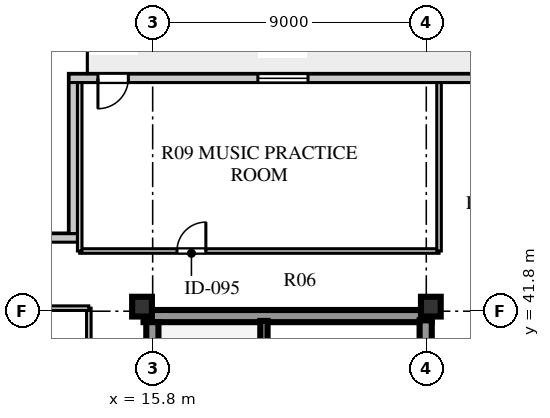
"""IFC4 building model, lengths in metres.
Left out: names, types, materials, properties, quantities, classifications, styles, units other than length and angle.
Written with IfcOpenShell. Run it as: python <this file> out.ifc"""

import sys

from ifc_helpers import new_model, si_unit, direction, frame, frame_2d, origin, origin_2d, place, context, subcontext, project, spatial, rectangle, extrude, element, fill, save


model = new_model("IFC4")
c1 = context("Model", 3, precision=1e-05, world=origin(), true_north=direction((0.0, 1.0)))
c2 = subcontext(c1, "Body", "Model", "MODEL_VIEW")
j1 = project(units=[si_unit("LENGTHUNIT", "METRE"), si_unit("PLANEANGLEUNIT", "RADIAN")], contexts=[c1])
p1 = place(None, origin())
s1 = spatial("IfcSite", under=j1, at=p1, CompositionType="ELEMENT")
p2 = place(p1, origin())
s2 = spatial("IfcBuilding", under=s1, at=p2, CompositionType="ELEMENT")
p3 = place(p2, frame((0.0, 0.0, 245.3)))
s3 = spatial("IfcBuildingStorey", under=s2, at=p3, CompositionType="ELEMENT", Elevation=245.3)
p4 = place(p3, frame((15.5, 41.64, 0.0), z_axis=(0.0, 0.0, 1.0), x_axis=(1.0, 0.0, 0.0)))
e1 = element("IfcWall", 1, at=p4, inside=s3, PredefinedType="SHEAR", context=c2, shape_type="SweptSolid", body=[
    extrude(rectangle(XDim=9.48, YDim=0.4, at=frame_2d((4.74, 0.0))), origin(), (0.0, 0.0, 1.0), 3.66),
])
p5 = place(p3, frame((15.79, 15.81, 0.0), z_axis=(0.0, 0.0, 1.0), x_axis=(0.0, 1.0, 0.0)))
e2 = element("IfcWall", 2, at=p5, inside=s3, PredefinedType="SHEAR", context=c2, shape_type="SweptSolid", body=[
    extrude(rectangle(XDim=25.63, YDim=0.4, at=frame_2d((12.815, 0.0))), origin(), (0.0, 0.0, 1.0), 3.66),
])
p6 = place(p3, frame((24.78, 15.74, 0.0), z_axis=(0.0, 0.0, 1.0), x_axis=(0.0, 1.0, 0.0)))
e3 = element("IfcWall", 3, at=p6, inside=s3, PredefinedType="SHEAR", context=c2, shape_type="SweptSolid", body=[
    extrude(rectangle(XDim=25.76, YDim=0.4, at=frame_2d((12.88, 0.0))), origin(), (0.0, 0.0, 1.0), 3.66),
])
p7 = place(p6, frame((1.61, 0.0, 0.0)))
e4 = element("IfcOpeningElement", 4, at=p7, cuts=e3, PredefinedType="OPENING", context=c2, shape_type="SweptSolid", body=[
    extrude(rectangle(XDim=1.2, YDim=2.1, at=frame_2d((0.6, 1.05))), frame((0.0, 0.21, 0.0), z_axis=(0.0, -1.0, 0.0), x_axis=(1.0, 0.0, 0.0)), (0.0, 0.0, 1.0), 0.42),
])
p8 = place(p6, frame((6.78, 0.0, 0.0)))
e5 = element("IfcOpeningElement", 5, at=p8, cuts=e3, PredefinedType="OPENING", context=c2, shape_type="SweptSolid", body=[
    extrude(rectangle(XDim=0.85, YDim=2.06, at=frame_2d((0.425, 1.03))), frame((0.0, 0.21, 0.0), z_axis=(0.0, -1.0, 0.0), x_axis=(1.0, 0.0, 0.0)), (0.0, 0.0, 1.0), 0.42),
])
p9 = place(p6, frame((12.11, 0.0, 0.0)))
e6 = element("IfcOpeningElement", 6, at=p9, cuts=e3, PredefinedType="OPENING", context=c2, shape_type="SweptSolid", body=[
    extrude(rectangle(XDim=1.5, YDim=2.12, at=frame_2d((0.75, 1.06))), frame((0.0, 0.21, 0.0), z_axis=(0.0, -1.0, 0.0), x_axis=(1.0, 0.0, 0.0)), (0.0, 0.0, 1.0), 0.42),
])
p10 = place(p6, frame((20.11, 0.0, 0.0)))
e7 = element("IfcOpeningElement", 7, at=p10, cuts=e3, PredefinedType="OPENING", context=c2, shape_type="SweptSolid", body=[
    extrude(rectangle(XDim=1.2, YDim=2.12, at=frame_2d((0.6, 1.06))), frame((0.0, 0.21, 0.0), z_axis=(0.0, -1.0, 0.0), x_axis=(1.0, 0.0, 0.0)), (0.0, 0.0, 1.0), 0.42),
])
p11 = place(p6, frame((24.01, 0.0, 0.0)))
e8 = element("IfcOpeningElement", 8, at=p11, cuts=e3, PredefinedType="OPENING", context=c2, shape_type="SweptSolid", body=[
    extrude(rectangle(XDim=0.95, YDim=2.1, at=frame_2d((0.475, 1.05))), frame((0.0, 0.21, 0.0), z_axis=(0.0, -1.0, 0.0), x_axis=(1.0, 0.0, 0.0)), (0.0, 0.0, 1.0), 0.42),
])
for number, where, z_axis, x_axis in (
    (9, (15.45, 41.95, 0.0), (0.0, 0.0, 1.0), (1.0, 0.0, 0.0)),
    (10, (24.95, 41.95, 0.0), (0.0, 0.0, 1.0), (1.0, 0.0, 0.0)),
):
    element("IfcColumn", number, at=place(p3, frame(where, z_axis=z_axis, x_axis=x_axis)), inside=s3, PredefinedType="COLUMN", context=c2, shape_type="SweptSolid", body=[
        extrude(rectangle(XDim=0.65, YDim=0.65, at=origin_2d()), origin(), (0.0, 0.0, 1.0), 3.66),
    ])
p12 = place(p3, frame((45.55, 49.46, 0.0), z_axis=(0.0, 0.0, 1.0), x_axis=(-1.0, 0.0, 0.0)))
e11 = element("IfcWall", 11, at=p12, inside=s3, PredefinedType="STANDARD", context=c2, shape_type="SweptSolid", body=[
    extrude(rectangle(XDim=32.5, YDim=0.28, at=frame_2d((16.25, 0.0))), origin(), (0.0, 0.0, 1.0), 3.66),
])
p13 = place(p12, frame((30.55, 0.0, 0.0)))
e12 = element("IfcOpeningElement", 12, at=p13, cuts=e11, PredefinedType="OPENING", context=c2, shape_type="SweptSolid", body=[
    extrude(rectangle(XDim=1.0, YDim=2.05, at=frame_2d((0.5, 1.025))), frame((0.0, 0.15, 0.0), z_axis=(0.0, -1.0, 0.0), x_axis=(1.0, 0.0, 0.0)), (0.0, 0.0, 1.0), 0.3),
])
p14 = place(p12, frame((24.64, 0.0, 0.8)))
e13 = element("IfcOpeningElement", 13, at=p14, cuts=e11, PredefinedType="OPENING", context=c2, shape_type="SweptSolid", body=[
    extrude(rectangle(XDim=1.65, YDim=1.95, at=frame_2d((0.825, 0.975))), frame((0.0, 0.15, 0.0), z_axis=(0.0, -1.0, 0.0), x_axis=(1.0, 0.0, 0.0)), (0.0, 0.0, 1.0), 0.3),
])
p15 = place(p12, frame((14.605, 0.0, 0.8)))
e14 = element("IfcOpeningElement", 14, at=p15, cuts=e11, PredefinedType="OPENING", context=c2, shape_type="SweptSolid", body=[
    extrude(rectangle(XDim=1.95, YDim=2.0, at=frame_2d((0.975, 1.0))), frame((0.0, 0.15, 0.0), z_axis=(0.0, -1.0, 0.0), x_axis=(1.0, 0.0, 0.0)), (0.0, 0.0, 1.0), 0.3),
])
p16 = place(p12, frame((4.345, 0.0, 0.8)))
e15 = element("IfcOpeningElement", 15, at=p16, cuts=e11, PredefinedType="OPENING", context=c2, shape_type="SweptSolid", body=[
    extrude(rectangle(XDim=2.25, YDim=2.0, at=frame_2d((1.125, 1.0))), frame((0.0, 0.15, 0.0), z_axis=(0.0, -1.0, 0.0), x_axis=(1.0, 0.0, 0.0)), (0.0, 0.0, 1.0), 0.3),
])
p17 = place(p3, frame((13.19, 49.32, 0.0), z_axis=(0.0, 0.0, 1.0), x_axis=(0.0, -1.0, 0.0)))
e16 = element("IfcWall", 16, at=p17, inside=s3, PredefinedType="STANDARD", context=c2, shape_type="SweptSolid", body=[
    extrude(rectangle(XDim=4.97, YDim=0.28, at=frame_2d((2.485, 0.0))), origin(), (0.0, 0.0, 1.0), 3.66),
])
p18 = place(p3, frame((13.33, 44.21, 0.0), z_axis=(0.0, 0.0, 1.0), x_axis=(-1.0, 0.0, 0.0)))
e17 = element("IfcWall", 17, at=p18, inside=s3, PredefinedType="STANDARD", context=c2, shape_type="SweptSolid", body=[
    extrude(rectangle(XDim=5.53, YDim=0.28, at=frame_2d((2.765, 0.0))), origin(), (0.0, 0.0, 1.0), 3.66),
])
p19 = place(p3, frame((19.46, 33.3, 0.0), z_axis=(0.0, 0.0, 1.0), x_axis=(0.0, 1.0, 0.0)))
e18 = element("IfcWall", 18, at=p19, inside=s3, PredefinedType="SHEAR", context=c2, shape_type="SweptSolid", body=[
    extrude(rectangle(XDim=8.18, YDim=0.24, at=frame_2d((4.09, 0.0))), origin(), (0.0, 0.0, 1.0), 3.9),
])
p20 = place(p19, frame((0.65, 0.0, 0.0)))
e19 = element("IfcOpeningElement", 19, at=p20, cuts=e18, PredefinedType="OPENING", context=c2, shape_type="SweptSolid", body=[
    extrude(rectangle(XDim=1.1, YDim=2.1, at=frame_2d((0.55, 1.05))), frame((0.0, 0.13, 0.0), z_axis=(0.0, -1.0, 0.0), x_axis=(1.0, 0.0, 0.0)), (0.0, 0.0, 1.0), 0.26),
])
p21 = place(p3, frame((13.4, 43.78, 0.0), z_axis=(0.0, 0.0, 1.0), x_axis=(1.0, 0.0, 0.0)))
e20 = element("IfcWall", 20, at=p21, inside=s3, PredefinedType="PARTITIONING", context=c2, shape_type="SweptSolid", body=[
    extrude(rectangle(XDim=11.82, YDim=0.15, at=frame_2d((5.91, 0.0))), origin(), (0.0, 0.0, 1.0), 3.66),
])
p22 = place(p21, frame((3.2, 0.0, 0.0)))
e21 = element("IfcOpeningElement", 21, at=p22, cuts=e20, PredefinedType="OPENING", context=c2, shape_type="SweptSolid", body=[
    extrude(rectangle(XDim=0.95, YDim=2.08, at=frame_2d((0.475, 1.04))), frame((0.0, 0.085, 0.0), z_axis=(0.0, -1.0, 0.0), x_axis=(1.0, 0.0, 0.0)), (0.0, 0.0, 1.0), 0.17),
])
p23 = place(p3, frame((13.4, 43.78, 0.0), z_axis=(0.0, 0.0, 1.0), x_axis=(0.0, 1.0, 0.0)))
e22 = element("IfcWall", 22, at=p23, inside=s3, PredefinedType="PARTITIONING", context=c2, shape_type="SweptSolid", body=[
    extrude(rectangle(XDim=5.54, YDim=0.15, at=frame_2d((2.77, 0.0))), origin(), (0.0, 0.0, 1.0), 3.66),
])
p24 = place(p3, frame((25.22, 43.78, 0.0), z_axis=(0.0, 0.0, 1.0), x_axis=(0.0, 1.0, 0.0)))
e23 = element("IfcWall", 23, at=p24, inside=s3, PredefinedType="PARTITIONING", context=c2, shape_type="SweptSolid", body=[
    extrude(rectangle(XDim=5.54, YDim=0.15, at=frame_2d((2.77, 0.0))), origin(), (0.0, 0.0, 1.0), 3.21),
])
p25 = place(p3, frame((13.7, 15.3, 0.0), z_axis=(0.0, 0.0, 1.0), x_axis=(0.0, 1.0, 0.0)))
e24 = element("IfcWall", 24, at=p25, inside=s3, PredefinedType="PARTITIONING", context=c2, shape_type="SweptSolid", body=[
    extrude(rectangle(XDim=26.6, YDim=0.15, at=frame_2d((13.3, 0.0))), origin(), (0.0, 0.0, 1.0), 3.66),
])
p26 = place(p25, frame((0.65, 0.0, 0.0)))
e25 = element("IfcOpeningElement", 25, at=p26, cuts=e24, PredefinedType="OPENING", context=c2, shape_type="SweptSolid", body=[
    extrude(rectangle(XDim=0.95, YDim=2.1, at=frame_2d((0.475, 1.05))), frame((0.0, 0.085, 0.0), z_axis=(0.0, -1.0, 0.0), x_axis=(1.0, 0.0, 0.0)), (0.0, 0.0, 1.0), 0.17),
])
p27 = place(p25, frame((11.55, 0.0, 0.0)))
e26 = element("IfcOpeningElement", 26, at=p27, cuts=e24, PredefinedType="OPENING", context=c2, shape_type="SweptSolid", body=[
    extrude(rectangle(XDim=0.95, YDim=2.1, at=frame_2d((0.475, 1.05))), frame((0.0, 0.085, 0.0), z_axis=(0.0, -1.0, 0.0), x_axis=(1.0, 0.0, 0.0)), (0.0, 0.0, 1.0), 0.17),
])
p28 = place(p3, frame((8.08, 41.9, 0.0), z_axis=(0.0, 0.0, 1.0), x_axis=(1.0, 0.0, 0.0)))
e27 = element("IfcWall", 27, at=p28, inside=s3, PredefinedType="PARTITIONING", context=c2, shape_type="SweptSolid", body=[
    extrude(rectangle(XDim=5.62, YDim=0.15, at=frame_2d((2.81, 0.0))), origin(), (0.0, 0.0, 1.0), 3.21),
])
p29 = place(p13, frame((1.0, 0.0, 0.0), z_axis=(0.0, 0.0, 1.0), x_axis=(-1.0, 0.0, 0.0)))
e28 = element("IfcDoor", 28, at=p29, inside=s3, OperationType="SINGLE_SWING_LEFT", PredefinedType="DOOR", context=c2, shape_type="SweptSolid", body=[
    extrude(rectangle(XDim=1.0, YDim=2.05, at=frame_2d((0.5, 1.025))), frame((0.0, 0.025, 0.0), z_axis=(0.0, -1.0, 0.0), x_axis=(1.0, 0.0, 0.0)), (0.0, 0.0, 1.0), 0.05),
])
fill(e12, e28)
p30 = place(p14, origin())
e29 = element("IfcWindow", 29, at=p30, inside=s3, PartitioningType="SINGLE_PANEL", PredefinedType="WINDOW", context=c2, shape_type="SweptSolid", body=[
    extrude(rectangle(XDim=1.65, YDim=1.95, at=frame_2d((0.825, 0.975))), frame((0.0, 0.03, 0.0), z_axis=(0.0, -1.0, 0.0), x_axis=(1.0, 0.0, 0.0)), (0.0, 0.0, 1.0), 0.06),
])
fill(e13, e29)
p31 = place(p22, origin())
e30 = element("IfcDoor", 30, at=p31, inside=s3, OperationType="SINGLE_SWING_RIGHT", PredefinedType="DOOR", context=c2, shape_type="SweptSolid", body=[
    extrude(rectangle(XDim=0.95, YDim=2.08, at=frame_2d((0.475, 1.04))), frame((0.0, 0.025, 0.0), z_axis=(0.0, -1.0, 0.0), x_axis=(1.0, 0.0, 0.0)), (0.0, 0.0, 1.0), 0.05),
])
fill(e21, e30)
save(model, sys.argv[1])
